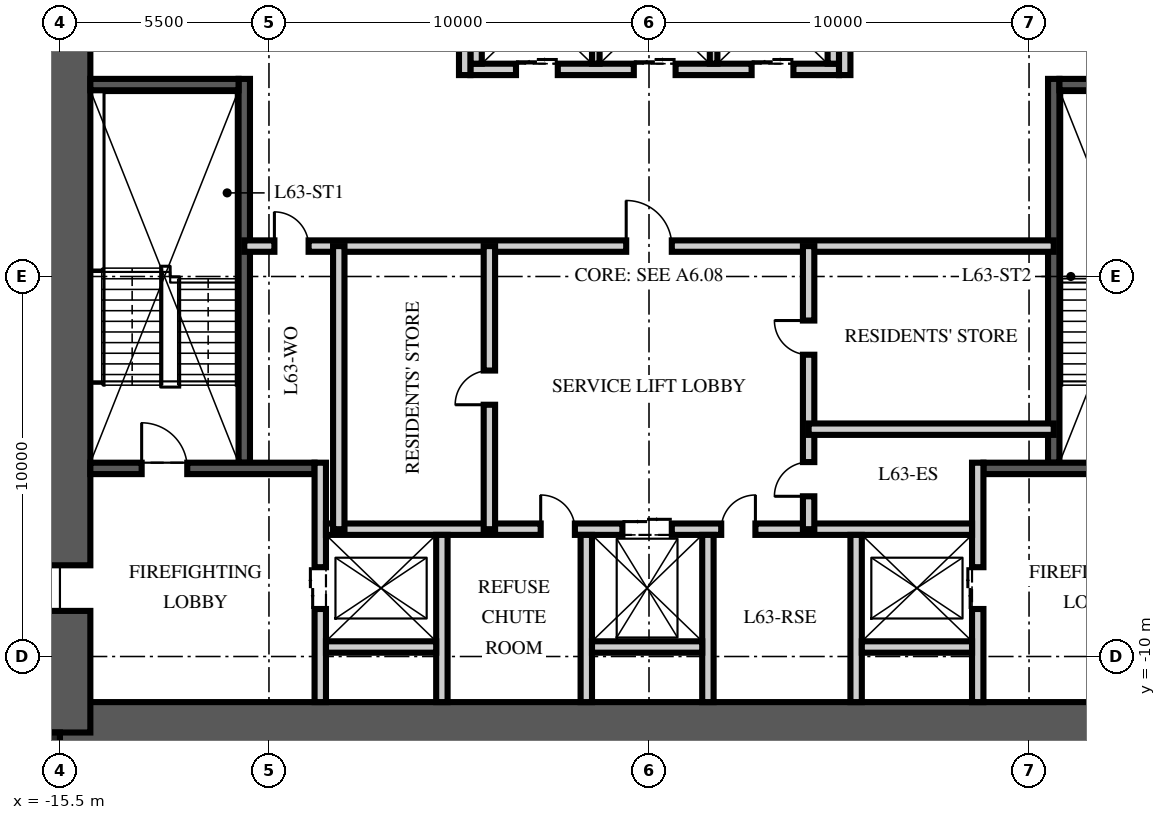
"""IFC4 building model, lengths in metres.
Left out: names, types, materials, properties, quantities, classifications, styles, units other than length and angle.
Written with IfcOpenShell. Run it as: python <this file> out.ifc"""

import sys

from ifc_helpers import new_model, si_unit, direction, frame, frame_2d, origin, origin_2d, place, context, subcontext, project, spatial, rectangle, extrude, element, fill, save


model = new_model("IFC4")
c1 = context("Model", 3, precision=1e-05, world=origin(), true_north=direction((0.0, 1.0)))
c2 = subcontext(c1, "Body", "Model", "MODEL_VIEW")
j1 = project(units=[si_unit("LENGTHUNIT", "METRE"), si_unit("PLANEANGLEUNIT", "RADIAN")], contexts=[c1])
p1 = place(None, origin())
s1 = spatial("IfcSite", under=j1, at=p1, CompositionType="ELEMENT")
p2 = place(p1, origin())
s2 = spatial("IfcBuilding", under=s1, at=p2, CompositionType="ELEMENT")
p3 = place(p2, frame((0.0, 0.0, 252.0)))
s3 = spatial("IfcBuildingStorey", under=s2, at=p3, CompositionType="ELEMENT", Elevation=252.0)
p4 = place(p3, frame((-15.5, -12.0, -0.25), z_axis=(0.0, 0.0, 1.0), x_axis=(1.0, 0.0, 0.0)))
e1 = element("IfcWall", 1, at=p4, inside=s3, PredefinedType="SHEAR", context=c2, shape_type="SweptSolid", body=[
    extrude(rectangle(XDim=31.0, YDim=1.6, at=frame_2d((15.5, 0.0))), origin(), (0.0, 0.0, 1.0), 3.75),
])
p5 = place(p3, frame((-15.5, -12.0, -0.25), z_axis=(0.0, 0.0, 1.0), x_axis=(0.0, 1.0, 0.0)))
e2 = element("IfcWall", 2, at=p5, inside=s3, PredefinedType="SHEAR", context=c2, shape_type="SweptSolid", body=[
    extrude(rectangle(XDim=24.0, YDim=1.6, at=frame_2d((12.0, 0.0))), origin(), (0.0, 0.0, 1.0), 3.75),
])
p6 = place(p5, frame((3.2, 0.0, 0.25)))
e3 = element("IfcOpeningElement", 3, at=p6, cuts=e2, PredefinedType="OPENING", context=c2, shape_type="SweptSolid", body=[
    extrude(rectangle(XDim=1.2, YDim=2.1, at=frame_2d((0.6, 1.05))), frame((0.0, 0.81, 0.0), z_axis=(0.0, -1.0, 0.0), x_axis=(1.0, 0.0, 0.0)), (0.0, 0.0, 1.0), 1.62),
])
p7 = place(p5, frame((19.3, 0.0, 0.25)))
e4 = element("IfcOpeningElement", 4, at=p7, cuts=e2, PredefinedType="OPENING", context=c2, shape_type="SweptSolid", body=[
    extrude(rectangle(XDim=1.8, YDim=2.1, at=frame_2d((0.9, 1.05))), frame((0.0, 0.81, 0.0), z_axis=(0.0, -1.0, 0.0), x_axis=(1.0, 0.0, 0.0)), (0.0, 0.0, 1.0), 1.62),
])
p8 = place(p3, frame((-15.9, -12.4, -0.25), z_axis=(0.0, 0.0, 1.0), x_axis=(1.0, 0.0, 0.0)))
e5 = element("IfcColumn", 5, at=p8, inside=s3, PredefinedType="COLUMN", context=c2, shape_type="SweptSolid", body=[
    extrude(rectangle(XDim=0.8, YDim=0.8, at=origin_2d()), origin(), (0.0, 0.0, 1.0), 3.75),
])
p9 = place(p3, frame((-10.65, -4.9, 0.0), z_axis=(0.0, 0.0, 1.0), x_axis=(0.0, 1.0, 0.0)))
e6 = element("IfcWall", 6, at=p9, inside=s3, PredefinedType="SOLIDWALL", context=c2, shape_type="SweptSolid", body=[
    extrude(rectangle(XDim=10.1, YDim=0.3, at=frame_2d((5.05, 0.0))), origin(), (0.0, 0.0, 1.0), 3.5),
])
p10 = place(p3, frame((-14.7, -5.05, 0.0), z_axis=(0.0, 0.0, 1.0), x_axis=(1.0, 0.0, 0.0)))
e7 = element("IfcWall", 7, at=p10, inside=s3, PredefinedType="SOLIDWALL", context=c2, shape_type="SweptSolid", body=[
    extrude(rectangle(XDim=5.9, YDim=0.3, at=frame_2d((2.95, 0.0))), origin(), (0.0, 0.0, 1.0), 3.5),
])
p11 = place(p10, frame((1.35, 0.0, 0.0)))
e8 = element("IfcOpeningElement", 8, at=p11, cuts=e7, PredefinedType="OPENING", context=c2, shape_type="SweptSolid", body=[
    extrude(rectangle(XDim=1.2, YDim=2.1, at=frame_2d((0.6, 1.05))), frame((0.0, 0.16, 0.0), z_axis=(0.0, -1.0, 0.0), x_axis=(1.0, 0.0, 0.0)), (0.0, 0.0, 1.0), 0.32),
])
p12 = place(p3, frame((-14.7, 5.05, 0.0), z_axis=(0.0, 0.0, 1.0), x_axis=(1.0, 0.0, 0.0)))
e9 = element("IfcWall", 9, at=p12, inside=s3, PredefinedType="SOLIDWALL", context=c2, shape_type="SweptSolid", body=[
    extrude(rectangle(XDim=3.9, YDim=0.3, at=frame_2d((1.95, 0.0))), origin(), (0.0, 0.0, 1.0), 3.5),
])
p13 = place(p3, frame((-8.65, -11.2, 0.0), z_axis=(0.0, 0.0, 1.0), x_axis=(0.0, 1.0, 0.0)))
e10 = element("IfcWall", 10, at=p13, inside=s3, PredefinedType="PARTITIONING", context=c2, shape_type="SweptSolid", body=[
    extrude(rectangle(XDim=6.3, YDim=0.3, at=frame_2d((3.15, 0.0))), origin(), (0.0, 0.0, 1.0), 3.5),
])
p14 = place(p13, frame((2.45, 0.0, 0.0)))
e11 = element("IfcOpeningElement", 11, at=p14, cuts=e10, PredefinedType="OPENING", context=c2, shape_type="SweptSolid", body=[
    extrude(rectangle(XDim=1.1, YDim=2.1, at=frame_2d((0.55, 1.05))), frame((0.0, 0.16, 0.0), z_axis=(0.0, -1.0, 0.0), x_axis=(1.0, 0.0, 0.0)), (0.0, 0.0, 1.0), 0.32),
])
p15 = place(p3, frame((10.65, -4.9, 0.0), z_axis=(0.0, 0.0, 1.0), x_axis=(0.0, 1.0, 0.0)))
e12 = element("IfcWall", 12, at=p15, inside=s3, PredefinedType="SOLIDWALL", context=c2, shape_type="SweptSolid", body=[
    extrude(rectangle(XDim=10.1, YDim=0.3, at=frame_2d((5.05, 0.0))), origin(), (0.0, 0.0, 1.0), 3.5),
])
p16 = place(p3, frame((14.7, -5.05, 0.0), z_axis=(0.0, 0.0, 1.0), x_axis=(-1.0, 0.0, 0.0)))
e13 = element("IfcWall", 13, at=p16, inside=s3, PredefinedType="SOLIDWALL", context=c2, shape_type="SweptSolid", body=[
    extrude(rectangle(XDim=5.9, YDim=0.3, at=frame_2d((2.95, 0.0))), origin(), (0.0, 0.0, 1.0), 3.5),
])
p17 = place(p16, frame((1.35, 0.0, 0.0)))
e14 = element("IfcOpeningElement", 14, at=p17, cuts=e13, PredefinedType="OPENING", context=c2, shape_type="SweptSolid", body=[
    extrude(rectangle(XDim=1.2, YDim=2.1, at=frame_2d((0.6, 1.05))), frame((0.0, 0.16, 0.0), z_axis=(0.0, -1.0, 0.0), x_axis=(1.0, 0.0, 0.0)), (0.0, 0.0, 1.0), 0.32),
])
p18 = place(p3, frame((14.7, 5.05, 0.0), z_axis=(0.0, 0.0, 1.0), x_axis=(-1.0, 0.0, 0.0)))
e15 = element("IfcWall", 15, at=p18, inside=s3, PredefinedType="SOLIDWALL", context=c2, shape_type="SweptSolid", body=[
    extrude(rectangle(XDim=3.9, YDim=0.3, at=frame_2d((1.95, 0.0))), origin(), (0.0, 0.0, 1.0), 3.5),
])
p19 = place(p3, frame((8.65, -11.2, 0.0), z_axis=(0.0, 0.0, 1.0), x_axis=(0.0, 1.0, 0.0)))
e16 = element("IfcWall", 16, at=p19, inside=s3, PredefinedType="PARTITIONING", context=c2, shape_type="SweptSolid", body=[
    extrude(rectangle(XDim=6.3, YDim=0.3, at=frame_2d((3.15, 0.0))), origin(), (0.0, 0.0, 1.0), 3.5),
])
p20 = place(p19, frame((2.45, 0.0, 0.0)))
e17 = element("IfcOpeningElement", 17, at=p20, cuts=e16, PredefinedType="OPENING", context=c2, shape_type="SweptSolid", body=[
    extrude(rectangle(XDim=1.1, YDim=2.1, at=frame_2d((0.55, 1.05))), frame((0.0, 0.16, 0.0), z_axis=(0.0, -1.0, 0.0), x_axis=(1.0, 0.0, 0.0)), (0.0, 0.0, 1.0), 0.32),
])
p21 = place(p3, frame((-8.5, -6.65, 0.0), z_axis=(0.0, 0.0, 1.0), x_axis=(1.0, 0.0, 0.0)))
e18 = element("IfcWall", 18, at=p21, inside=s3, PredefinedType="PARTITIONING", context=c2, shape_type="SweptSolid", body=[
    extrude(rectangle(XDim=17.0, YDim=0.3, at=frame_2d((8.5, 0.0))), origin(), (0.0, 0.0, 1.0), 3.5),
])
p22 = place(p21, frame((7.8, 0.0, 0.0)))
e19 = element("IfcOpeningElement", 19, at=p22, cuts=e18, PredefinedType="OPENING", context=c2, shape_type="SweptSolid", body=[
    extrude(rectangle(XDim=1.3, YDim=2.4, at=frame_2d((0.65, 1.2))), frame((0.0, 0.16, 0.0), z_axis=(0.0, -1.0, 0.0), x_axis=(1.0, 0.0, 0.0)), (0.0, 0.0, 1.0), 0.32),
])
p23 = place(p21, frame((5.65, 0.0, 0.0)))
e20 = element("IfcOpeningElement", 20, at=p23, cuts=e18, PredefinedType="OPENING", context=c2, shape_type="SweptSolid", body=[
    extrude(rectangle(XDim=0.9, YDim=2.1, at=frame_2d((0.45, 1.05))), frame((0.0, 0.16, 0.0), z_axis=(0.0, -1.0, 0.0), x_axis=(1.0, 0.0, 0.0)), (0.0, 0.0, 1.0), 0.32),
])
p24 = place(p21, frame((10.4, 0.0, 0.0)))
e21 = element("IfcOpeningElement", 21, at=p24, cuts=e18, PredefinedType="OPENING", context=c2, shape_type="SweptSolid", body=[
    extrude(rectangle(XDim=0.9, YDim=2.1, at=frame_2d((0.45, 1.05))), frame((0.0, 0.16, 0.0), z_axis=(0.0, -1.0, 0.0), x_axis=(1.0, 0.0, 0.0)), (0.0, 0.0, 1.0), 0.32),
])
for number, where, z_axis, x_axis in (
    (22, (-5.45, -11.2, 0.0), (0.0, 0.0, 1.0), (0.0, 1.0, 0.0)),
    (23, (-1.65, -11.2, 0.0), (0.0, 0.0, 1.0), (0.0, 1.0, 0.0)),
    (24, (1.55, -11.2, 0.0), (0.0, 0.0, 1.0), (0.0, 1.0, 0.0)),
    (25, (5.45, -11.2, 0.0), (0.0, 0.0, 1.0), (0.0, 1.0, 0.0)),
):
    element("IfcWall", number, at=place(p3, frame(where, z_axis=z_axis, x_axis=x_axis)), inside=s3, PredefinedType="PARTITIONING", context=c2, shape_type="SweptSolid", body=[
        extrude(rectangle(XDim=4.4, YDim=0.3, at=frame_2d((2.2, 0.0))), origin(), (0.0, 0.0, 1.0), 3.5),
    ])
for number, where, z_axis, x_axis in (
    (26, (-8.5, -9.75, 0.0), (0.0, 0.0, 1.0), (1.0, 0.0, 0.0)),
    (27, (-1.5, -9.75, 0.0), (0.0, 0.0, 1.0), (1.0, 0.0, 0.0)),
    (28, (5.6, -9.75, 0.0), (0.0, 0.0, 1.0), (1.0, 0.0, 0.0)),
):
    element("IfcWall", number, at=place(p3, frame(where, z_axis=z_axis, x_axis=x_axis)), inside=s3, PredefinedType="PARTITIONING", context=c2, shape_type="SweptSolid", body=[
        extrude(rectangle(XDim=2.9, YDim=0.3, at=frame_2d((1.45, 0.0))), origin(), (0.0, 0.0, 1.0), 3.5),
    ])
p25 = place(p3, frame((-4.7, 5.45, 0.0), z_axis=(0.0, 0.0, 1.0), x_axis=(1.0, 0.0, 0.0)))
e29 = element("IfcWall", 29, at=p25, inside=s3, PredefinedType="PARTITIONING", context=c2, shape_type="SweptSolid", body=[
    extrude(rectangle(XDim=9.7, YDim=0.3, at=frame_2d((4.85, 0.0))), origin(), (0.0, 0.0, 1.0), 3.5),
])
p26 = place(p25, frame((1.2, 0.0, 0.0)))
e30 = element("IfcOpeningElement", 30, at=p26, cuts=e29, PredefinedType="OPENING", context=c2, shape_type="SweptSolid", body=[
    extrude(rectangle(XDim=1.1, YDim=2.1, at=frame_2d((0.55, 1.05))), frame((0.0, 0.16, 0.0), z_axis=(0.0, -1.0, 0.0), x_axis=(1.0, 0.0, 0.0)), (0.0, 0.0, 1.0), 0.32),
])
p27 = place(p25, frame((4.3, 0.0, 0.0)))
e31 = element("IfcOpeningElement", 31, at=p27, cuts=e29, PredefinedType="OPENING", context=c2, shape_type="SweptSolid", body=[
    extrude(rectangle(XDim=1.1, YDim=2.1, at=frame_2d((0.55, 1.05))), frame((0.0, 0.16, 0.0), z_axis=(0.0, -1.0, 0.0), x_axis=(1.0, 0.0, 0.0)), (0.0, 0.0, 1.0), 0.32),
])
p28 = place(p25, frame((7.4, 0.0, 0.0)))
e32 = element("IfcOpeningElement", 32, at=p28, cuts=e29, PredefinedType="OPENING", context=c2, shape_type="SweptSolid", body=[
    extrude(rectangle(XDim=1.1, YDim=2.1, at=frame_2d((0.55, 1.05))), frame((0.0, 0.16, 0.0), z_axis=(0.0, -1.0, 0.0), x_axis=(1.0, 0.0, 0.0)), (0.0, 0.0, 1.0), 0.32),
])
for number, where, z_axis, x_axis in (
    (33, (-4.55, 5.6, 0.0), (0.0, 0.0, 1.0), (0.0, 1.0, 0.0)),
    (34, (4.85, 5.6, 0.0), (0.0, 0.0, 1.0), (0.0, 1.0, 0.0)),
):
    element("IfcWall", number, at=place(p3, frame(where, z_axis=z_axis, x_axis=x_axis)), inside=s3, PredefinedType="PARTITIONING", context=c2, shape_type="SweptSolid", body=[
        extrude(rectangle(XDim=2.8, YDim=0.3, at=frame_2d((1.4, 0.0))), origin(), (0.0, 0.0, 1.0), 3.5),
    ])
for number, where, z_axis, x_axis in (
    (35, (-1.4, 5.6, 0.0), (0.0, 0.0, 1.0), (0.0, 1.0, 0.0)),
    (36, (1.7, 5.6, 0.0), (0.0, 0.0, 1.0), (0.0, 1.0, 0.0)),
):
    element("IfcWall", number, at=place(p3, frame(where, z_axis=z_axis, x_axis=x_axis)), inside=s3, PredefinedType="PARTITIONING", context=c2, shape_type="SweptSolid", body=[
        extrude(rectangle(XDim=2.8, YDim=0.2, at=frame_2d((1.4, 0.0))), origin(), (0.0, 0.0, 1.0), 3.5),
    ])
p29 = place(p3, frame((-10.65, 0.8, 0.0), z_axis=(0.0, 0.0, 1.0), x_axis=(1.0, 0.0, 0.0)))
e37 = element("IfcWall", 37, at=p29, inside=s3, PredefinedType="PARTITIONING", context=c2, shape_type="SweptSolid", body=[
    extrude(rectangle(XDim=21.3, YDim=0.3, at=frame_2d((10.65, 0.0))), origin(), (0.0, 0.0, 1.0), 3.5),
])
p30 = place(p29, frame((10.05, 0.0, 0.0)))
e38 = element("IfcOpeningElement", 38, at=p30, cuts=e37, PredefinedType="OPENING", context=c2, shape_type="SweptSolid", body=[
    extrude(rectangle(XDim=1.2, YDim=2.1, at=frame_2d((0.6, 1.05))), frame((0.0, 0.16, 0.0), z_axis=(0.0, -1.0, 0.0), x_axis=(1.0, 0.0, 0.0)), (0.0, 0.0, 1.0), 0.32),
])
p31 = place(p29, frame((0.793, 0.0, 0.0)))
e39 = element("IfcOpeningElement", 39, at=p31, cuts=e37, PredefinedType="OPENING", context=c2, shape_type="SweptSolid", body=[
    extrude(rectangle(XDim=0.9, YDim=2.1, at=frame_2d((0.45, 1.05))), frame((0.0, 0.16, 0.0), z_axis=(0.0, -1.0, 0.0), x_axis=(1.0, 0.0, 0.0)), (0.0, 0.0, 1.0), 0.32),
])
p32 = place(p3, frame((-4.2, -6.65, 0.0), z_axis=(0.0, 0.0, 1.0), x_axis=(0.0, 1.0, 0.0)))
e40 = element("IfcWall", 40, at=p32, inside=s3, PredefinedType="PARTITIONING", context=c2, shape_type="SweptSolid", body=[
    extrude(rectangle(XDim=7.45, YDim=0.3, at=frame_2d((3.725, 0.0))), origin(), (0.0, 0.0, 1.0), 3.5),
])
p33 = place(p32, frame((3.275, 0.0, 0.0)))
e41 = element("IfcOpeningElement", 41, at=p33, cuts=e40, PredefinedType="OPENING", context=c2, shape_type="SweptSolid", body=[
    extrude(rectangle(XDim=0.9, YDim=2.1, at=frame_2d((0.45, 1.05))), frame((0.0, 0.16, 0.0), z_axis=(0.0, -1.0, 0.0), x_axis=(1.0, 0.0, 0.0)), (0.0, 0.0, 1.0), 0.32),
])
p34 = place(p3, frame((4.2, -6.65, 0.0), z_axis=(0.0, 0.0, 1.0), x_axis=(0.0, 1.0, 0.0)))
e42 = element("IfcWall", 42, at=p34, inside=s3, PredefinedType="PARTITIONING", context=c2, shape_type="SweptSolid", body=[
    extrude(rectangle(XDim=7.45, YDim=0.3, at=frame_2d((3.725, 0.0))), origin(), (0.0, 0.0, 1.0), 3.5),
])
p35 = place(p34, frame((0.866, 0.0, 0.0)))
e43 = element("IfcOpeningElement", 43, at=p35, cuts=e42, PredefinedType="OPENING", context=c2, shape_type="SweptSolid", body=[
    extrude(rectangle(XDim=0.9, YDim=2.1, at=frame_2d((0.45, 1.05))), frame((0.0, 0.16, 0.0), z_axis=(0.0, -1.0, 0.0), x_axis=(1.0, 0.0, 0.0)), (0.0, 0.0, 1.0), 0.32),
])
p36 = place(p34, frame((4.591, 0.0, 0.0)))
e44 = element("IfcOpeningElement", 44, at=p36, cuts=e42, PredefinedType="OPENING", context=c2, shape_type="SweptSolid", body=[
    extrude(rectangle(XDim=0.9, YDim=2.1, at=frame_2d((0.45, 1.05))), frame((0.0, 0.16, 0.0), z_axis=(0.0, -1.0, 0.0), x_axis=(1.0, 0.0, 0.0)), (0.0, 0.0, 1.0), 0.32),
])
p37 = place(p3, frame((-8.163, -6.65, 0.0), z_axis=(0.0, 0.0, 1.0), x_axis=(0.0, 1.0, 0.0)))
e45 = element("IfcWall", 45, at=p37, inside=s3, PredefinedType="PARTITIONING", context=c2, shape_type="SweptSolid", body=[
    extrude(rectangle(XDim=7.45, YDim=0.3, at=frame_2d((3.725, 0.0))), origin(), (0.0, 0.0, 1.0), 3.5),
])
p38 = place(p3, frame((10.65, -4.018, 0.0), z_axis=(0.0, 0.0, 1.0), x_axis=(-1.0, 0.0, 0.0)))
e46 = element("IfcWall", 46, at=p38, inside=s3, PredefinedType="PARTITIONING", context=c2, shape_type="SweptSolid", body=[
    extrude(rectangle(XDim=6.45, YDim=0.3, at=frame_2d((3.225, 0.0))), origin(), (0.0, 0.0, 1.0), 3.5),
])
p39 = place(p3, frame((-4.85, 5.3, 0.0), z_axis=(0.0, 0.0, 1.0), x_axis=(0.0, 1.0, 0.0)))
e47 = element("IfcWall", 47, at=p39, inside=s3, PredefinedType="PARTITIONING", context=c2, shape_type="SweptSolid", body=[
    extrude(rectangle(XDim=5.9, YDim=0.3, at=frame_2d((2.95, 0.0))), origin(), (0.0, 0.0, 1.0), 3.5),
])
p40 = place(p39, frame((4.15, 0.0, 0.0)))
e48 = element("IfcOpeningElement", 48, at=p40, cuts=e47, PredefinedType="OPENING", context=c2, shape_type="SweptSolid", body=[
    extrude(rectangle(XDim=0.9, YDim=2.1, at=frame_2d((0.45, 1.05))), frame((0.0, 0.16, 0.0), z_axis=(0.0, -1.0, 0.0), x_axis=(1.0, 0.0, 0.0)), (0.0, 0.0, 1.0), 0.32),
])
p41 = place(p3, frame((5.15, 5.3, 0.0), z_axis=(0.0, 0.0, 1.0), x_axis=(0.0, 1.0, 0.0)))
e49 = element("IfcWall", 49, at=p41, inside=s3, PredefinedType="PARTITIONING", context=c2, shape_type="SweptSolid", body=[
    extrude(rectangle(XDim=5.9, YDim=0.3, at=frame_2d((2.95, 0.0))), origin(), (0.0, 0.0, 1.0), 3.5),
])
p42 = place(p41, frame((4.15, 0.0, 0.0)))
e50 = element("IfcOpeningElement", 50, at=p42, cuts=e49, PredefinedType="OPENING", context=c2, shape_type="SweptSolid", body=[
    extrude(rectangle(XDim=0.9, YDim=2.1, at=frame_2d((0.45, 1.05))), frame((0.0, 0.16, 0.0), z_axis=(0.0, -1.0, 0.0), x_axis=(1.0, 0.0, 0.0)), (0.0, 0.0, 1.0), 0.32),
])
p43 = place(p11, origin())
e51 = element("IfcDoor", 51, at=p43, inside=s3, OperationType="SINGLE_SWING_LEFT", PredefinedType="DOOR", context=c2, shape_type="SweptSolid", body=[
    extrude(rectangle(XDim=1.2, YDim=2.1, at=frame_2d((0.6, 1.05))), frame((0.0, 0.025, 0.0), z_axis=(0.0, -1.0, 0.0), x_axis=(1.0, 0.0, 0.0)), (0.0, 0.0, 1.0), 0.05),
])
fill(e8, e51)
p44 = place(p6, origin())
e52 = element("IfcDoor", 52, at=p44, inside=s3, OperationType="SINGLE_SWING_LEFT", PredefinedType="DOOR", context=c2, shape_type="SweptSolid", body=[
    extrude(rectangle(XDim=1.2, YDim=2.1, at=frame_2d((0.6, 1.05))), frame((0.0, 0.025, 0.0), z_axis=(0.0, -1.0, 0.0), x_axis=(1.0, 0.0, 0.0)), (0.0, 0.0, 1.0), 0.05),
])
fill(e3, e52)
p45 = place(p14, origin())
e53 = element("IfcDoor", 53, at=p45, inside=s3, OperationType="DOUBLE_DOOR_SLIDING", PredefinedType="DOOR", context=c2, shape_type="SweptSolid", body=[
    extrude(rectangle(XDim=1.1, YDim=2.1, at=frame_2d((0.55, 1.05))), frame((0.0, 0.025, 0.0), z_axis=(0.0, -1.0, 0.0), x_axis=(1.0, 0.0, 0.0)), (0.0, 0.0, 1.0), 0.05),
])
fill(e11, e53)
p46 = place(p20, origin())
e54 = element("IfcDoor", 54, at=p46, inside=s3, OperationType="DOUBLE_DOOR_SLIDING", PredefinedType="DOOR", context=c2, shape_type="SweptSolid", body=[
    extrude(rectangle(XDim=1.1, YDim=2.1, at=frame_2d((0.55, 1.05))), frame((0.0, 0.025, 0.0), z_axis=(0.0, -1.0, 0.0), x_axis=(1.0, 0.0, 0.0)), (0.0, 0.0, 1.0), 0.05),
])
fill(e17, e54)
p47 = place(p26, origin())
e55 = element("IfcDoor", 55, at=p47, inside=s3, OperationType="DOUBLE_DOOR_SLIDING", PredefinedType="DOOR", context=c2, shape_type="SweptSolid", body=[
    extrude(rectangle(XDim=1.1, YDim=2.1, at=frame_2d((0.55, 1.05))), frame((0.0, 0.025, 0.0), z_axis=(0.0, -1.0, 0.0), x_axis=(1.0, 0.0, 0.0)), (0.0, 0.0, 1.0), 0.05),
])
fill(e30, e55)
p48 = place(p27, origin())
e56 = element("IfcDoor", 56, at=p48, inside=s3, OperationType="DOUBLE_DOOR_SLIDING", PredefinedType="DOOR", context=c2, shape_type="SweptSolid", body=[
    extrude(rectangle(XDim=1.1, YDim=2.1, at=frame_2d((0.55, 1.05))), frame((0.0, 0.025, 0.0), z_axis=(0.0, -1.0, 0.0), x_axis=(1.0, 0.0, 0.0)), (0.0, 0.0, 1.0), 0.05),
])
fill(e31, e56)
p49 = place(p28, origin())
e57 = element("IfcDoor", 57, at=p49, inside=s3, OperationType="DOUBLE_DOOR_SLIDING", PredefinedType="DOOR", context=c2, shape_type="SweptSolid", body=[
    extrude(rectangle(XDim=1.1, YDim=2.1, at=frame_2d((0.55, 1.05))), frame((0.0, 0.025, 0.0), z_axis=(0.0, -1.0, 0.0), x_axis=(1.0, 0.0, 0.0)), (0.0, 0.0, 1.0), 0.05),
])
fill(e32, e57)
p50 = place(p22, origin())
e58 = element("IfcDoor", 58, at=p50, inside=s3, OperationType="DOUBLE_DOOR_SLIDING", PredefinedType="DOOR", context=c2, shape_type="SweptSolid", body=[
    extrude(rectangle(XDim=1.3, YDim=2.4, at=frame_2d((0.65, 1.2))), frame((0.0, 0.025, 0.0), z_axis=(0.0, -1.0, 0.0), x_axis=(1.0, 0.0, 0.0)), (0.0, 0.0, 1.0), 0.05),
])
fill(e19, e58)
p51 = place(p30, origin())
e59 = element("IfcDoor", 59, at=p51, inside=s3, OperationType="SINGLE_SWING_LEFT", PredefinedType="DOOR", context=c2, shape_type="SweptSolid", body=[
    extrude(rectangle(XDim=1.2, YDim=2.1, at=frame_2d((0.6, 1.05))), frame((0.0, 0.025, 0.0), z_axis=(0.0, -1.0, 0.0), x_axis=(1.0, 0.0, 0.0)), (0.0, 0.0, 1.0), 0.05),
])
fill(e38, e59)
p52 = place(p23, origin())
e60 = element("IfcDoor", 60, at=p52, inside=s3, OperationType="SINGLE_SWING_LEFT", PredefinedType="DOOR", context=c2, shape_type="SweptSolid", body=[
    extrude(rectangle(XDim=0.9, YDim=2.1, at=frame_2d((0.45, 1.05))), frame((0.0, 0.025, 0.0), z_axis=(0.0, -1.0, 0.0), x_axis=(1.0, 0.0, 0.0)), (0.0, 0.0, 1.0), 0.05),
])
fill(e20, e60)
p53 = place(p24, origin())
e61 = element("IfcDoor", 61, at=p53, inside=s3, OperationType="SINGLE_SWING_RIGHT", PredefinedType="DOOR", context=c2, shape_type="SweptSolid", body=[
    extrude(rectangle(XDim=0.9, YDim=2.1, at=frame_2d((0.45, 1.05))), frame((0.0, 0.025, 0.0), z_axis=(0.0, -1.0, 0.0), x_axis=(1.0, 0.0, 0.0)), (0.0, 0.0, 1.0), 0.05),
])
fill(e21, e61)
p54 = place(p33, origin())
e62 = element("IfcDoor", 62, at=p54, inside=s3, OperationType="SINGLE_SWING_LEFT", PredefinedType="DOOR", context=c2, shape_type="SweptSolid", body=[
    extrude(rectangle(XDim=0.9, YDim=2.1, at=frame_2d((0.45, 1.05))), frame((0.0, 0.025, 0.0), z_axis=(0.0, -1.0, 0.0), x_axis=(1.0, 0.0, 0.0)), (0.0, 0.0, 1.0), 0.05),
])
fill(e41, e62)
p55 = place(p31, origin())
e63 = element("IfcDoor", 63, at=p55, inside=s3, OperationType="SINGLE_SWING_LEFT", PredefinedType="DOOR", context=c2, shape_type="SweptSolid", body=[
    extrude(rectangle(XDim=0.9, YDim=2.1, at=frame_2d((0.45, 1.05))), frame((0.0, 0.025, 0.0), z_axis=(0.0, -1.0, 0.0), x_axis=(1.0, 0.0, 0.0)), (0.0, 0.0, 1.0), 0.05),
])
fill(e39, e63)
p56 = place(p35, origin())
e64 = element("IfcDoor", 64, at=p56, inside=s3, OperationType="SINGLE_SWING_LEFT", PredefinedType="DOOR", context=c2, shape_type="SweptSolid", body=[
    extrude(rectangle(XDim=0.9, YDim=2.1, at=frame_2d((0.45, 1.05))), frame((0.0, 0.025, 0.0), z_axis=(0.0, -1.0, 0.0), x_axis=(1.0, 0.0, 0.0)), (0.0, 0.0, 1.0), 0.05),
])
fill(e43, e64)
p57 = place(p36, origin())
e65 = element("IfcDoor", 65, at=p57, inside=s3, OperationType="SINGLE_SWING_RIGHT", PredefinedType="DOOR", context=c2, shape_type="SweptSolid", body=[
    extrude(rectangle(XDim=0.9, YDim=2.1, at=frame_2d((0.45, 1.05))), frame((0.0, 0.025, 0.0), z_axis=(0.0, -1.0, 0.0), x_axis=(1.0, 0.0, 0.0)), (0.0, 0.0, 1.0), 0.05),
])
fill(e44, e65)
save(model, sys.argv[1])
